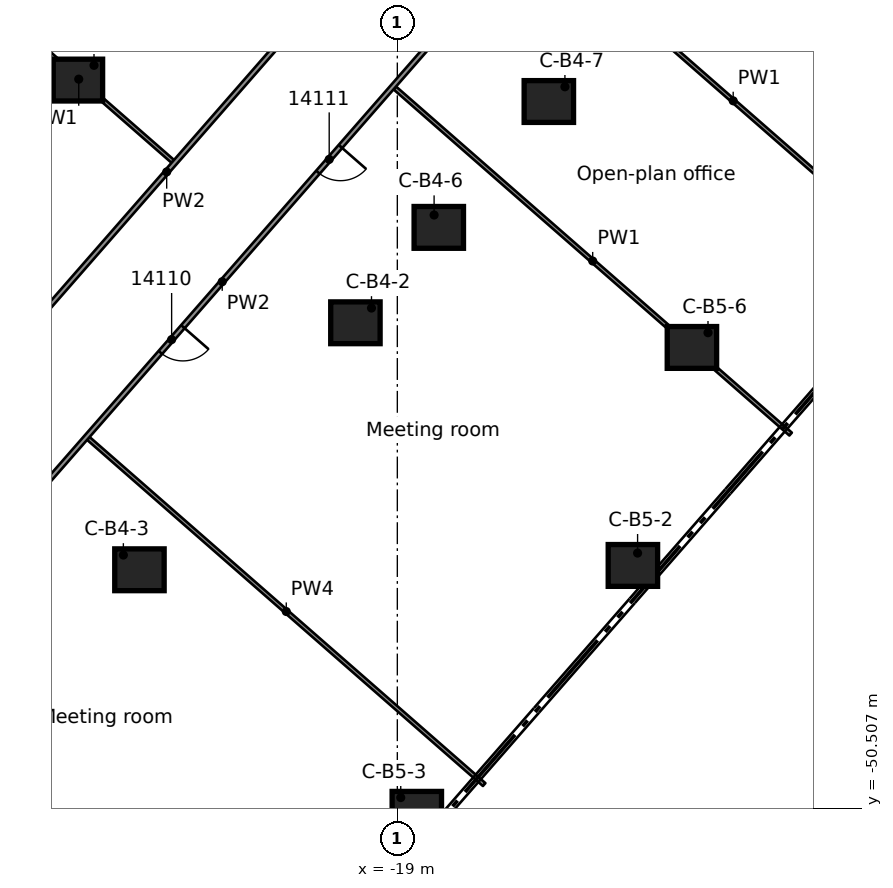
"""IFC4 building model, lengths in metres.
Left out: names, types, materials, properties, quantities, classifications, styles, units other than length and angle.
Written with IfcOpenShell. Run it as: python <this file> out.ifc"""

import sys

from ifc_helpers import new_model, si_unit, direction, frame, frame_2d, origin, origin_2d, place, context, subcontext, project, spatial, rectangle, extrude, element, fill, save


model = new_model("IFC4")
c1 = context("Model", 3, precision=1e-05, world=origin(), true_north=direction((0.0, 1.0)))
c2 = subcontext(c1, "Body", "Model", "MODEL_VIEW")
j1 = project(units=[si_unit("LENGTHUNIT", "METRE"), si_unit("PLANEANGLEUNIT", "RADIAN")], contexts=[c1])
p1 = place(None, origin())
s1 = spatial("IfcSite", under=j1, at=p1, CompositionType="ELEMENT")
p2 = place(p1, origin())
s2 = spatial("IfcBuilding", under=s1, at=p2, CompositionType="ELEMENT")
p3 = place(p2, frame((0.0, 0.0, 69.3)))
s3 = spatial("IfcBuildingStorey", under=s2, at=p3, CompositionType="ELEMENT", Elevation=69.3)
for number, where, z_axis, x_axis in (
    (1, (-27.405, -31.341, 0.0), (0.0, 0.0, 1.0), (1.0, 0.0, 0.0)),
    (2, (-20.103, -37.727, 0.0), (0.0, 0.0, 1.0), (1.0, 0.0, 0.0)),
    (3, (-25.786, -44.226, 0.0), (0.0, 0.0, 1.0), (1.0, 0.0, 0.0)),
    (4, (-17.909, -35.217, 0.0), (0.0, 0.0, 1.0), (1.0, 0.0, 0.0)),
    (5, (-15.013, -31.905, 0.0), (0.0, 0.0, 1.0), (1.0, 0.0, 0.0)),
    (6, (-12.801, -44.112, 0.0), (0.0, 0.0, 1.0), (1.0, 0.0, 0.0)),
    (7, (-18.487, -50.608, 0.0), (0.0, 0.0, 1.0), (1.0, 0.0, 0.0)),
    (8, (-11.248, -38.376, 0.0), (0.0, 0.0, 1.0), (1.0, 0.0, 0.0)),
):
    element("IfcColumn", number, at=place(p3, frame(where, z_axis=z_axis, x_axis=x_axis)), inside=s3, PredefinedType="COLUMN", context=c2, shape_type="SweptSolid", body=[
        extrude(rectangle(XDim=1.3, YDim=1.1, at=origin_2d()), origin(), (0.0, 0.0, 1.0), 3.5),
    ])
p4 = place(p3, frame((-27.13, -40.771, 0.0), z_axis=(0.0, 0.0, 1.0), x_axis=(0.752792007078, -0.65825845538, 0.0)))
e9 = element("IfcWall", 9, at=p4, inside=s3, PredefinedType="PARTITIONING", context=c2, shape_type="SweptSolid", body=[
    extrude(rectangle(XDim=13.835, YDim=0.1, at=frame_2d((6.917, 0.0))), origin(), (0.0, 0.0, 1.0), 2.419),
])
p5 = place(p3, frame((-29.858, -29.153, 0.0), z_axis=(0.0, 0.0, 1.0), x_axis=(0.752836606275, -0.658207447734, 0.0)))
e10 = element("IfcWall", 10, at=p5, inside=s3, PredefinedType="PARTITIONING", context=c2, shape_type="SweptSolid", body=[
    extrude(rectangle(XDim=6.574, YDim=0.1, at=frame_2d((3.287, 0.0))), origin(), (0.0, 0.0, 1.0), 3.03),
])
p6 = place(p3, frame((-19.067, -31.548, 0.0), z_axis=(0.0, 0.0, 1.0), x_axis=(0.752795260656, -0.658254734531, 0.0)))
e11 = element("IfcWall", 11, at=p6, inside=s3, PredefinedType="PARTITIONING", context=c2, shape_type="SweptSolid", body=[
    extrude(rectangle(XDim=13.836, YDim=0.1, at=frame_2d((6.918, 0.0))), origin(), (0.0, 0.0, 1.0), 3.03),
])
p7 = place(p3, frame((-15.364, -27.338, 0.0), z_axis=(0.0, 0.0, 1.0), x_axis=(0.75280535981, -0.658243184729, 0.0)))
e12 = element("IfcWall", 12, at=p7, inside=s3, PredefinedType="PARTITIONING", context=c2, shape_type="SweptSolid", body=[
    extrude(rectangle(XDim=13.82, YDim=0.1, at=frame_2d((6.91, 0.0))), origin(), (0.0, 0.0, 1.0), 3.03),
])
p8 = place(p3, frame((-15.464, -27.333, 0.0), z_axis=(0.0, 0.0, 1.0), x_axis=(-0.658239133646, -0.752808902004, 0.0)))
e13 = element("IfcWall", 13, at=p8, inside=s3, PredefinedType="PARTITIONING", context=c2, shape_type="SweptSolid", body=[
    extrude(rectangle(XDim=24.745, YDim=0.125, at=frame_2d((12.372, 0.0))), origin(), (0.0, 0.0, 1.0), 3.03),
])
p9 = place(p8, frame((2.288, 0.0, 0.0)))
e14 = element("IfcOpeningElement", 14, at=p9, cuts=e13, PredefinedType="OPENING", context=c2, shape_type="SweptSolid", body=[
    extrude(rectangle(XDim=1.1, YDim=2.1, at=frame_2d((0.55, 1.05))), frame((0.0, 0.073, 0.0), z_axis=(0.0, -1.0, 0.0), x_axis=(1.0, 0.0, 0.0)), (0.0, 0.0, 1.0), 0.145),
])
p10 = place(p8, frame((13.944, 0.0, 0.0)))
e15 = element("IfcOpeningElement", 15, at=p10, cuts=e13, PredefinedType="OPENING", context=c2, shape_type="SweptSolid", body=[
    extrude(rectangle(XDim=0.9, YDim=2.1, at=frame_2d((0.45, 1.05))), frame((0.0, 0.073, 0.0), z_axis=(0.0, -1.0, 0.0), x_axis=(1.0, 0.0, 0.0)), (0.0, 0.0, 1.0), 0.145),
])
p11 = place(p8, frame((7.646, 0.0, 0.0)))
e16 = element("IfcOpeningElement", 16, at=p11, cuts=e13, PredefinedType="OPENING", context=c2, shape_type="SweptSolid", body=[
    extrude(rectangle(XDim=0.9, YDim=2.1, at=frame_2d((0.45, 1.05))), frame((0.0, 0.073, 0.0), z_axis=(0.0, -1.0, 0.0), x_axis=(1.0, 0.0, 0.0)), (0.0, 0.0, 1.0), 0.145),
])
p12 = place(p8, frame((20.895, 0.0, 0.0)))
e17 = element("IfcOpeningElement", 17, at=p12, cuts=e13, PredefinedType="OPENING", context=c2, shape_type="SweptSolid", body=[
    extrude(rectangle(XDim=0.9, YDim=2.1, at=frame_2d((0.45, 1.05))), frame((0.0, 0.073, 0.0), z_axis=(0.0, -1.0, 0.0), x_axis=(1.0, 0.0, 0.0)), (0.0, 0.0, 1.0), 0.145),
])
p13 = place(p3, frame((-32.036, -41.726, 0.0), z_axis=(0.0, 0.0, 1.0), x_axis=(0.658231851406, 0.752815269369, 0.0)))
e18 = element("IfcWall", 18, at=p13, inside=s3, PredefinedType="PARTITIONING", context=c2, shape_type="SweptSolid", body=[
    extrude(rectangle(XDim=21.169, YDim=0.125, at=frame_2d((10.584, 0.0))), origin(), (0.0, 0.0, 1.0), 3.03),
])
p14 = place(p3, frame((-22.736, -20.913, 0.0), z_axis=(0.0, 0.0, 1.0), x_axis=(-0.658236458127, -0.752811241409, 0.0)))
e19 = element("IfcWall", 19, at=p14, inside=s3, PredefinedType="PARTITIONING", context=c2, shape_type="SweptSolid", body=[
    extrude(rectangle(XDim=21.79, YDim=0.125, at=frame_2d((10.895, 0.0))), origin(), (0.0, 0.0, 1.0), 3.03),
])
p15 = place(p14, frame((2.35, 0.0, 0.0)))
e20 = element("IfcOpeningElement", 20, at=p15, cuts=e19, PredefinedType="OPENING", context=c2, shape_type="SweptSolid", body=[
    extrude(rectangle(XDim=0.9, YDim=2.1, at=frame_2d((0.45, 1.05))), frame((0.0, 0.073, 0.0), z_axis=(0.0, -1.0, 0.0), x_axis=(1.0, 0.0, 0.0)), (0.0, 0.0, 1.0), 0.145),
])
p16 = place(p14, frame((7.691, 0.0, 0.0)))
e21 = element("IfcOpeningElement", 21, at=p16, cuts=e19, PredefinedType="OPENING", context=c2, shape_type="SweptSolid", body=[
    extrude(rectangle(XDim=0.9, YDim=2.1, at=frame_2d((0.45, 1.05))), frame((0.0, 0.073, 0.0), z_axis=(0.0, -1.0, 0.0), x_axis=(1.0, 0.0, 0.0)), (0.0, 0.0, 1.0), 0.145),
])
p17 = place(p3, frame((-41.314, -37.6, 0.0), z_axis=(0.0, 0.0, 1.0), x_axis=(0.658340906106, 0.752719902319, 0.0)))
e22 = element("IfcWall", 22, at=p17, inside=s3, PredefinedType="PARTITIONING", context=c2, shape_type="SweptSolid", body=[
    extrude(rectangle(XDim=24.075, YDim=0.125, at=frame_2d((12.038, 0.0))), origin(), (0.0, 0.0, 1.0), 3.03),
])
p18 = place(p17, frame((10.05, 0.0, 0.0)))
e23 = element("IfcOpeningElement", 23, at=p18, cuts=e22, PredefinedType="OPENING", context=c2, shape_type="SweptSolid", body=[
    extrude(rectangle(XDim=0.9, YDim=2.1, at=frame_2d((0.45, 1.05))), frame((0.0, 0.073, 0.0), z_axis=(0.0, -1.0, 0.0), x_axis=(1.0, 0.0, 0.0)), (0.0, 0.0, 1.0), 0.145),
])
p19 = place(p17, frame((4.6, 0.0, 0.0)))
e24 = element("IfcOpeningElement", 24, at=p19, cuts=e22, PredefinedType="OPENING", context=c2, shape_type="SweptSolid", body=[
    extrude(rectangle(XDim=0.9, YDim=2.1, at=frame_2d((0.45, 1.05))), frame((0.0, 0.073, 0.0), z_axis=(0.0, -1.0, 0.0), x_axis=(1.0, 0.0, 0.0)), (0.0, 0.0, 1.0), 0.145),
])
p20 = place(p17, frame((21.301, 0.0, 0.0)))
e25 = element("IfcOpeningElement", 25, at=p20, cuts=e22, PredefinedType="OPENING", context=c2, shape_type="SweptSolid", body=[
    extrude(rectangle(XDim=0.9, YDim=2.1, at=frame_2d((0.45, 1.05))), frame((0.0, 0.073, 0.0), z_axis=(0.0, -1.0, 0.0), x_axis=(1.0, 0.0, 0.0)), (0.0, 0.0, 1.0), 0.145),
])
p21 = place(p17, frame((16.0, 0.0, 0.0)))
e26 = element("IfcOpeningElement", 26, at=p21, cuts=e22, PredefinedType="OPENING", context=c2, shape_type="SweptSolid", body=[
    extrude(rectangle(XDim=0.9, YDim=2.1, at=frame_2d((0.45, 1.05))), frame((0.0, 0.073, 0.0), z_axis=(0.0, -1.0, 0.0), x_axis=(1.0, 0.0, 0.0)), (0.0, 0.0, 1.0), 0.145),
])
p22 = place(p10, origin())
e27 = element("IfcDoor", 27, at=p22, inside=s3, OperationType="SINGLE_SWING_RIGHT", PredefinedType="DOOR", context=c2, shape_type="SweptSolid", body=[
    extrude(rectangle(XDim=0.9, YDim=2.1, at=frame_2d((0.45, 1.05))), frame((0.0, 0.025, 0.0), z_axis=(0.0, -1.0, 0.0), x_axis=(1.0, 0.0, 0.0)), (0.0, 0.0, 1.0), 0.05),
])
fill(e15, e27)
p23 = place(p11, origin())
e28 = element("IfcDoor", 28, at=p23, inside=s3, OperationType="SINGLE_SWING_LEFT", PredefinedType="DOOR", context=c2, shape_type="SweptSolid", body=[
    extrude(rectangle(XDim=0.9, YDim=2.1, at=frame_2d((0.45, 1.05))), frame((0.0, 0.025, 0.0), z_axis=(0.0, -1.0, 0.0), x_axis=(1.0, 0.0, 0.0)), (0.0, 0.0, 1.0), 0.05),
])
fill(e16, e28)
save(model, sys.argv[1])
